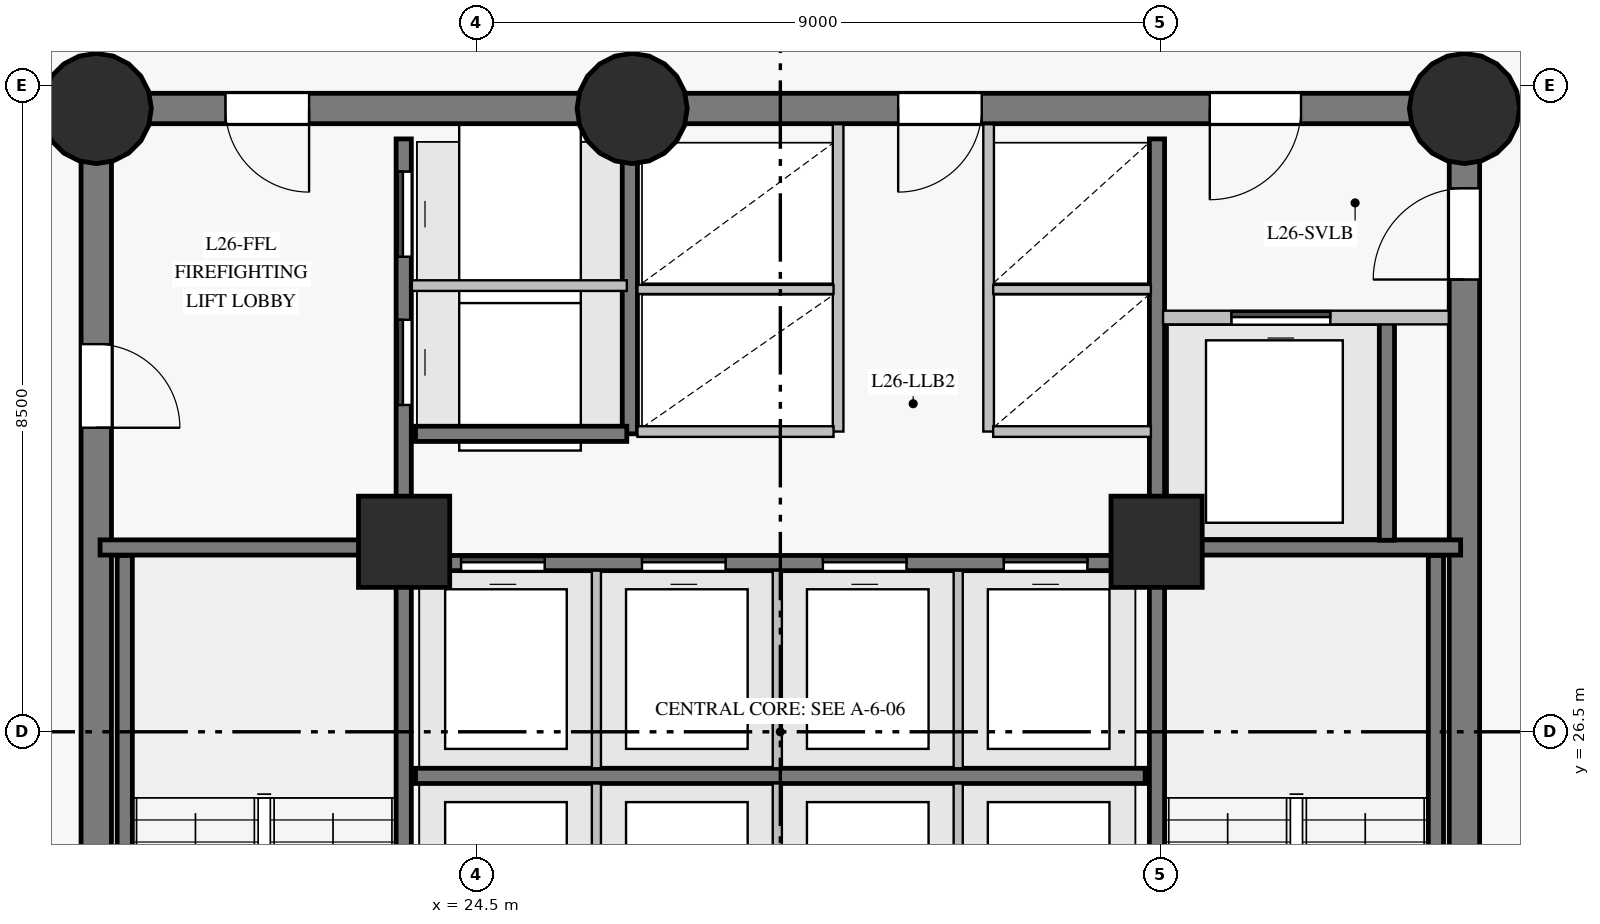
"""IFC4 building model, lengths in metres.
Left out: names, types, materials, properties, quantities, classifications, styles, units other than length and angle.
Written with IfcOpenShell. Run it as: python <this file> out.ifc"""

import sys

from ifc_helpers import new_model, si_unit, direction, frame, frame_2d, origin, origin_with_axes, origin_2d, place, context, subcontext, project, spatial, rectangle, circle, extrude, source, transform, mapped, element, fill, save


model = new_model("IFC4")
c1 = context("Model", 3, precision=1e-05, world=origin(), true_north=direction((0.0, 1.0)))
c2 = subcontext(c1, "Body", "Model", "MODEL_VIEW")
j1 = project(units=[si_unit("LENGTHUNIT", "METRE"), si_unit("PLANEANGLEUNIT", "RADIAN")], contexts=[c1])
p1 = place(None, origin())
s1 = spatial("IfcSite", under=j1, at=p1, CompositionType="ELEMENT")
p2 = place(p1, origin())
s2 = spatial("IfcBuilding", under=s1, at=p2, CompositionType="ELEMENT")
p3 = place(p2, frame((0.0, 0.0, 99.25)))
s3 = spatial("IfcBuildingStorey", under=s2, at=p3, CompositionType="ELEMENT", Elevation=99.25)
p4 = place(p3, frame((37.5, 18.3, 0.0), z_axis=(0.0, 0.0, 1.0), x_axis=(0.0, 1.0, 0.0)))
e1 = element("IfcWall", 1, at=p4, inside=s3, PredefinedType="SHEAR", context=c2, shape_type="SweptSolid", body=[
    extrude(rectangle(XDim=16.4, YDim=0.4, at=frame_2d((8.2, 0.0))), origin(), (0.0, 0.0, 1.0), 2.825),
])
p5 = place(p4, frame((14.15, 0.0, 0.0)))
e2 = element("IfcOpeningElement", 2, at=p5, cuts=e1, PredefinedType="OPENING", context=c2, shape_type="SweptSolid", body=[
    extrude(rectangle(XDim=1.2, YDim=2.15, at=frame_2d((0.6, 1.075))), frame((0.0, 0.21, 0.0), z_axis=(0.0, -1.0, 0.0), x_axis=(1.0, 0.0, 0.0)), (0.0, 0.0, 1.0), 0.42),
])
p6 = place(p3, frame((37.5, 34.7, 0.0), z_axis=(0.0, 0.0, 1.0), x_axis=(-1.0, 0.0, 0.0)))
e3 = element("IfcWall", 3, at=p6, inside=s3, PredefinedType="SHEAR", context=c2, shape_type="SweptSolid", body=[
    extrude(rectangle(XDim=10.95, YDim=0.4, at=frame_2d((5.475, 0.0))), origin(), (0.0, 0.0, 1.0), 2.825),
])
p7 = place(p6, frame((2.15, 0.0, 0.0)))
e4 = element("IfcOpeningElement", 4, at=p7, cuts=e3, PredefinedType="OPENING", context=c2, shape_type="SweptSolid", body=[
    extrude(rectangle(XDim=1.2, YDim=2.15, at=frame_2d((0.6, 1.075))), frame((0.0, 0.21, 0.0), z_axis=(0.0, -1.0, 0.0), x_axis=(1.0, 0.0, 0.0)), (0.0, 0.0, 1.0), 0.42),
])
p8 = place(p6, frame((6.35, 0.0, 0.0)))
e5 = element("IfcOpeningElement", 5, at=p8, cuts=e3, PredefinedType="OPENING", context=c2, shape_type="SweptSolid", body=[
    extrude(rectangle(XDim=1.1, YDim=2.15, at=frame_2d((0.55, 1.075))), frame((0.0, 0.21, 0.0), z_axis=(0.0, -1.0, 0.0), x_axis=(1.0, 0.0, 0.0)), (0.0, 0.0, 1.0), 0.42),
])
p9 = place(p3, frame((26.55, 34.7, 0.0), z_axis=(0.0, 0.0, 1.0), x_axis=(-1.0, 0.0, 0.0)))
e6 = element("IfcWall", 6, at=p9, inside=s3, PredefinedType="SHEAR", context=c2, shape_type="SweptSolid", body=[
    extrude(rectangle(XDim=7.05, YDim=0.4, at=frame_2d((3.525, 0.0))), origin(), (0.0, 0.0, 1.0), 2.825),
])
p10 = place(p9, frame((4.25, 0.0, 0.0)))
e7 = element("IfcOpeningElement", 7, at=p10, cuts=e6, PredefinedType="OPENING", context=c2, shape_type="SweptSolid", body=[
    extrude(rectangle(XDim=1.1, YDim=2.15, at=frame_2d((0.55, 1.075))), frame((0.0, 0.21, 0.0), z_axis=(0.0, -1.0, 0.0), x_axis=(1.0, 0.0, 0.0)), (0.0, 0.0, 1.0), 0.42),
])
p11 = place(p3, frame((19.5, 34.7, 0.0), z_axis=(0.0, 0.0, 1.0), x_axis=(0.0, -1.0, 0.0)))
e8 = element("IfcWall", 8, at=p11, inside=s3, PredefinedType="SHEAR", context=c2, shape_type="SweptSolid", body=[
    extrude(rectangle(XDim=16.4, YDim=0.4, at=frame_2d((8.2, 0.0))), origin(), (0.0, 0.0, 1.0), 2.825),
])
p12 = place(p11, frame((3.1, 0.0, 0.0)))
e9 = element("IfcOpeningElement", 9, at=p12, cuts=e8, PredefinedType="OPENING", context=c2, shape_type="SweptSolid", body=[
    extrude(rectangle(XDim=1.1, YDim=2.15, at=frame_2d((0.55, 1.075))), frame((0.0, 0.21, 0.0), z_axis=(0.0, -1.0, 0.0), x_axis=(1.0, 0.0, 0.0)), (0.0, 0.0, 1.0), 0.42),
])
m1 = source(origin_with_axes(), c2, "Body", "SweptSolid", [
    extrude(circle(Radius=0.725, at=origin_2d()), origin(), (0.0, 0.0, 1.0), 3.05),
])
for number, where, z_axis, x_axis in (
    (10, (19.5, 34.7, 0.0), (0.0, 0.0, 1.0), (1.0, 0.0, 0.0)),
    (11, (26.55, 34.7, 0.0), (0.0, 0.0, 1.0), (1.0, 0.0, 0.0)),
    (12, (37.5, 34.7, 0.0), (0.0, 0.0, 1.0), (1.0, 0.0, 0.0)),
):
    element("IfcColumn", number, at=place(p3, frame(where, z_axis=z_axis, x_axis=x_axis)), inside=s3, PredefinedType="COLUMN", context=c2, shape_type="MappedRepresentation", body=[
        mapped(m1, transform((0.0, 0.0, 0.0), scale=1.0)),
    ])
m2 = source(origin_with_axes(), c2, "Body", "SweptSolid", [
    extrude(rectangle(XDim=1.2, YDim=1.2, at=origin_2d()), origin(), (0.0, 0.0, 1.0), 3.05),
])
for number, where, z_axis, x_axis in (
    (13, (23.55, 29.0, 0.0), (0.0, 0.0, 1.0), (1.0, 0.0, 0.0)),
    (14, (33.45, 29.0, 0.0), (0.0, 0.0, 1.0), (1.0, 0.0, 0.0)),
):
    element("IfcColumn", number, at=place(p3, frame(where, z_axis=z_axis, x_axis=x_axis)), inside=s3, PredefinedType="COLUMN", context=c2, shape_type="MappedRepresentation", body=[
        mapped(m2, transform((0.0, 0.0, 0.0), scale=1.0)),
    ])
p13 = place(p3, frame((23.545, 18.7, 0.0), z_axis=(0.0, 0.0, 1.0), x_axis=(0.0, 1.0, 0.0)))
e15 = element("IfcWall", 15, at=p13, inside=s3, PredefinedType="SHEAR", context=c2, shape_type="SweptSolid", body=[
    extrude(rectangle(XDim=15.6, YDim=0.2, at=frame_2d((7.8, 0.0))), origin(), (0.0, 0.0, 1.0), 2.825),
])
p14 = place(p13, frame((2.75, 0.0, 0.0)))
e16 = element("IfcOpeningElement", 16, at=p14, cuts=e15, PredefinedType="OPENING", context=c2, shape_type="SweptSolid", body=[
    extrude(rectangle(XDim=1.15, YDim=2.15, at=frame_2d((0.575, 1.075))), frame((0.0, 0.11, 0.0), z_axis=(0.0, -1.0, 0.0), x_axis=(1.0, 0.0, 0.0)), (0.0, 0.0, 1.0), 0.22),
])
p15 = place(p13, frame((0.14, 0.0, 0.0)))
e17 = element("IfcOpeningElement", 17, at=p15, cuts=e15, PredefinedType="OPENING", context=c2, shape_type="SweptSolid", body=[
    extrude(rectangle(XDim=0.88, YDim=2.1, at=frame_2d((0.44, 1.05))), frame((0.0, 0.11, 0.0), z_axis=(0.0, -1.0, 0.0), x_axis=(1.0, 0.0, 0.0)), (0.0, 0.0, 1.0), 0.22),
])
p16 = place(p13, frame((1.36, 0.0, 0.0)))
e18 = element("IfcOpeningElement", 18, at=p16, cuts=e15, PredefinedType="OPENING", context=c2, shape_type="SweptSolid", body=[
    extrude(rectangle(XDim=0.88, YDim=2.1, at=frame_2d((0.44, 1.05))), frame((0.0, 0.11, 0.0), z_axis=(0.0, -1.0, 0.0), x_axis=(1.0, 0.0, 0.0)), (0.0, 0.0, 1.0), 0.22),
])
p17 = place(p13, frame((12.1, 0.0, 0.0)))
e19 = element("IfcOpeningElement", 19, at=p17, cuts=e15, PredefinedType="OPENING", context=c2, shape_type="SweptSolid", body=[
    extrude(rectangle(XDim=1.12, YDim=2.15, at=frame_2d((0.56, 1.075))), frame((0.0, 0.11, 0.0), z_axis=(0.0, -1.0, 0.0), x_axis=(1.0, 0.0, 0.0)), (0.0, 0.0, 1.0), 0.22),
])
p18 = place(p13, frame((14.05, 0.0, 0.0)))
e20 = element("IfcOpeningElement", 20, at=p18, cuts=e15, PredefinedType="OPENING", context=c2, shape_type="SweptSolid", body=[
    extrude(rectangle(XDim=1.12, YDim=2.15, at=frame_2d((0.56, 1.075))), frame((0.0, 0.11, 0.0), z_axis=(0.0, -1.0, 0.0), x_axis=(1.0, 0.0, 0.0)), (0.0, 0.0, 1.0), 0.22),
])
p19 = place(p3, frame((33.455, 18.7, 0.0), z_axis=(0.0, 0.0, 1.0), x_axis=(0.0, 1.0, 0.0)))
e21 = element("IfcWall", 21, at=p19, inside=s3, PredefinedType="SHEAR", context=c2, shape_type="SweptSolid", body=[
    extrude(rectangle(XDim=15.6, YDim=0.2, at=frame_2d((7.8, 0.0))), origin(), (0.0, 0.0, 1.0), 2.825),
])
p20 = place(p19, frame((2.75, 0.0, 0.0)))
e22 = element("IfcOpeningElement", 22, at=p20, cuts=e21, PredefinedType="OPENING", context=c2, shape_type="SweptSolid", body=[
    extrude(rectangle(XDim=1.15, YDim=2.15, at=frame_2d((0.575, 1.075))), frame((0.0, 0.11, 0.0), z_axis=(0.0, -1.0, 0.0), x_axis=(1.0, 0.0, 0.0)), (0.0, 0.0, 1.0), 0.22),
])
p21 = place(p19, frame((0.55, 0.0, 0.0)))
e23 = element("IfcOpeningElement", 23, at=p21, cuts=e21, PredefinedType="OPENING", context=c2, shape_type="SweptSolid", body=[
    extrude(rectangle(XDim=0.94, YDim=2.1, at=frame_2d((0.47, 1.05))), frame((0.0, 0.11, 0.0), z_axis=(0.0, -1.0, 0.0), x_axis=(1.0, 0.0, 0.0)), (0.0, 0.0, 1.0), 0.22),
])
p22 = place(p3, frame((23.7, 25.92, 0.0), z_axis=(0.0, 0.0, 1.0), x_axis=(1.0, 0.0, 0.0)))
e24 = element("IfcWall", 24, at=p22, inside=s3, PredefinedType="SHEAR", context=c2, shape_type="SweptSolid", body=[
    extrude(rectangle(XDim=9.6, YDim=0.2, at=frame_2d((4.8, 0.0))), origin(), (0.0, 0.0, 1.0), 2.825),
])
p23 = place(p3, frame((23.7, 28.72, 0.0), z_axis=(0.0, 0.0, 1.0), x_axis=(1.0, 0.0, 0.0)))
e25 = element("IfcWall", 25, at=p23, inside=s3, PredefinedType="SHEAR", context=c2, shape_type="SweptSolid", body=[
    extrude(rectangle(XDim=9.6, YDim=0.2, at=frame_2d((4.8, 0.0))), origin(), (0.0, 0.0, 1.0), 2.825),
])
p24 = place(p23, frame((0.6, 0.0, 0.0)))
e26 = element("IfcOpeningElement", 26, at=p24, cuts=e25, PredefinedType="OPENING", context=c2, shape_type="SweptSolid", body=[
    extrude(rectangle(XDim=1.1, YDim=2.15, at=frame_2d((0.55, 1.075))), frame((0.0, 0.11, 0.0), z_axis=(0.0, -1.0, 0.0), x_axis=(1.0, 0.0, 0.0)), (0.0, 0.0, 1.0), 0.22),
])
p25 = place(p23, frame((2.98, 0.0, 0.0)))
e27 = element("IfcOpeningElement", 27, at=p25, cuts=e25, PredefinedType="OPENING", context=c2, shape_type="SweptSolid", body=[
    extrude(rectangle(XDim=1.1, YDim=2.15, at=frame_2d((0.55, 1.075))), frame((0.0, 0.11, 0.0), z_axis=(0.0, -1.0, 0.0), x_axis=(1.0, 0.0, 0.0)), (0.0, 0.0, 1.0), 0.22),
])
p26 = place(p23, frame((5.36, 0.0, 0.0)))
e28 = element("IfcOpeningElement", 28, at=p26, cuts=e25, PredefinedType="OPENING", context=c2, shape_type="SweptSolid", body=[
    extrude(rectangle(XDim=1.1, YDim=2.15, at=frame_2d((0.55, 1.075))), frame((0.0, 0.11, 0.0), z_axis=(0.0, -1.0, 0.0), x_axis=(1.0, 0.0, 0.0)), (0.0, 0.0, 1.0), 0.22),
])
p27 = place(p23, frame((7.74, 0.0, 0.0)))
e29 = element("IfcOpeningElement", 29, at=p27, cuts=e25, PredefinedType="OPENING", context=c2, shape_type="SweptSolid", body=[
    extrude(rectangle(XDim=1.1, YDim=2.15, at=frame_2d((0.55, 1.075))), frame((0.0, 0.11, 0.0), z_axis=(0.0, -1.0, 0.0), x_axis=(1.0, 0.0, 0.0)), (0.0, 0.0, 1.0), 0.22),
])
for number, where, z_axis, x_axis in (
    (30, (19.875, 21.32, 0.0), (0.0, 0.0, 1.0), (0.0, 1.0, 0.0)),
    (31, (37.125, 21.32, 0.0), (0.0, 0.0, 1.0), (0.0, 1.0, 0.0)),
):
    element("IfcWall", number, at=place(p3, frame(where, z_axis=z_axis, x_axis=x_axis)), inside=s3, PredefinedType="SHEAR", context=c2, shape_type="SweptSolid", body=[
        extrude(rectangle(XDim=7.5, YDim=0.2, at=frame_2d((3.75, 0.0))), origin(), (0.0, 0.0, 1.0), 2.825),
    ])
for number, where, z_axis, x_axis in (
    (32, (33.455, 28.925, 0.0), (0.0, 0.0, 1.0), (1.0, 0.0, 0.0)),
    (33, (19.55, 28.925, 0.0), (0.0, 0.0, 1.0), (1.0, 0.0, 0.0)),
):
    element("IfcWall", number, at=place(p3, frame(where, z_axis=z_axis, x_axis=x_axis)), inside=s3, PredefinedType="SHEAR", context=c2, shape_type="SweptSolid", body=[
        extrude(rectangle(XDim=3.995, YDim=0.2, at=frame_2d((1.998, 0.0))), origin(), (0.0, 0.0, 1.0), 2.825),
    ])
p28 = place(p3, frame((26.52, 30.42, 0.0), z_axis=(0.0, 0.0, 1.0), x_axis=(0.0, 1.0, 0.0)))
e34 = element("IfcWall", 34, at=p28, inside=s3, PredefinedType="SHEAR", context=c2, shape_type="SweptSolid", body=[
    extrude(rectangle(XDim=3.86, YDim=0.2, at=frame_2d((1.93, 0.0))), origin(), (0.0, 0.0, 1.0), 2.825),
])
p29 = place(p3, frame((36.48, 29.02, 0.0), z_axis=(0.0, 0.0, 1.0), x_axis=(0.0, 1.0, 0.0)))
e35 = element("IfcWall", 35, at=p29, inside=s3, PredefinedType="SHEAR", context=c2, shape_type="SweptSolid", body=[
    extrude(rectangle(XDim=2.86, YDim=0.2, at=frame_2d((1.43, 0.0))), origin(), (0.0, 0.0, 1.0), 2.825),
])
p30 = place(p3, frame((23.7, 30.42, 0.0), z_axis=(0.0, 0.0, 1.0), x_axis=(1.0, 0.0, 0.0)))
e36 = element("IfcWall", 36, at=p30, inside=s3, PredefinedType="SHEAR", context=c2, shape_type="SweptSolid", body=[
    extrude(rectangle(XDim=2.78, YDim=0.2, at=frame_2d((1.39, 0.0))), origin(), (0.0, 0.0, 1.0), 2.825),
])
for number, where, z_axis, x_axis in (
    (37, (29.26, 30.45, 0.0), (0.0, 0.0, 1.0), (0.0, 1.0, 0.0)),
    (38, (31.24, 30.45, 0.0), (0.0, 0.0, 1.0), (0.0, 1.0, 0.0)),
):
    element("IfcWall", number, at=place(p3, frame(where, z_axis=z_axis, x_axis=x_axis)), inside=s3, PredefinedType="PARTITIONING", context=c2, shape_type="SweptSolid", body=[
        extrude(rectangle(XDim=4.043, YDim=0.14, at=frame_2d((2.021, 0.0))), origin(), (0.0, 0.0, 1.0), 2.825),
    ])
p31 = place(p3, frame((33.535, 31.95, 0.0), z_axis=(0.0, 0.0, 1.0), x_axis=(1.0, 0.0, 0.0)))
e39 = element("IfcWall", 39, at=p31, inside=s3, PredefinedType="PARTITIONING", context=c2, shape_type="SweptSolid", body=[
    extrude(rectangle(XDim=3.759, YDim=0.18, at=frame_2d((1.879, 0.0))), origin(), (0.0, 0.0, 1.0), 2.825),
])
p32 = place(p31, frame((0.9, 0.0, 0.0)))
e40 = element("IfcOpeningElement", 40, at=p32, cuts=e39, PredefinedType="OPENING", context=c2, shape_type="SweptSolid", body=[
    extrude(rectangle(XDim=1.3, YDim=2.2, at=frame_2d((0.65, 1.1))), frame((0.0, 0.1, 0.0), z_axis=(0.0, -1.0, 0.0), x_axis=(1.0, 0.0, 0.0)), (0.0, 0.0, 1.0), 0.2),
])
p33 = place(p3, frame((23.652, 32.37, 0.0), z_axis=(0.0, 0.0, 1.0), x_axis=(1.0, 0.0, 0.0)))
e41 = element("IfcWall", 41, at=p33, inside=s3, PredefinedType="PARTITIONING", context=c2, shape_type="SweptSolid", body=[
    extrude(rectangle(XDim=2.828, YDim=0.14, at=frame_2d((1.414, 0.0))), origin(), (0.0, 0.0, 1.0), 2.825),
])
for number, where, z_axis, x_axis in (
    (42, (26.08, 23.22, 0.0), (0.0, 0.0, 1.0), (0.0, 1.0, 0.0)),
    (43, (28.46, 23.22, 0.0), (0.0, 0.0, 1.0), (0.0, 1.0, 0.0)),
    (44, (30.84, 23.22, 0.0), (0.0, 0.0, 1.0), (0.0, 1.0, 0.0)),
    (45, (26.08, 26.02, 0.0), (0.0, 0.0, 1.0), (0.0, 1.0, 0.0)),
    (46, (28.46, 26.02, 0.0), (0.0, 0.0, 1.0), (0.0, 1.0, 0.0)),
    (47, (30.84, 26.02, 0.0), (0.0, 0.0, 1.0), (0.0, 1.0, 0.0)),
):
    element("IfcWall", number, at=place(p3, frame(where, z_axis=z_axis, x_axis=x_axis)), inside=s3, PredefinedType="PARTITIONING", context=c2, shape_type="SweptSolid", body=[
        extrude(rectangle(XDim=2.6, YDim=0.12, at=frame_2d((1.3, 0.0))), origin(), (0.0, 0.0, 1.0), 2.825),
    ])
p34 = place(p3, frame((26.62, 30.45, 0.0), z_axis=(0.0, 0.0, 1.0), x_axis=(1.0, 0.0, 0.0)))
e48 = element("IfcWall", 48, at=p34, inside=s3, PredefinedType="PARTITIONING", context=c2, shape_type="SweptSolid", body=[
    extrude(rectangle(XDim=2.58, YDim=0.14, at=frame_2d((1.29, 0.0))), origin(), (0.0, 0.0, 1.0), 2.825),
])
p35 = place(p3, frame((26.62, 32.32, 0.0), z_axis=(0.0, 0.0, 1.0), x_axis=(1.0, 0.0, 0.0)))
e49 = element("IfcWall", 49, at=p35, inside=s3, PredefinedType="PARTITIONING", context=c2, shape_type="SweptSolid", body=[
    extrude(rectangle(XDim=2.58, YDim=0.12, at=frame_2d((1.29, 0.0))), origin(), (0.0, 0.0, 1.0), 2.825),
])
p36 = place(p3, frame((31.3, 30.45, 0.0), z_axis=(0.0, 0.0, 1.0), x_axis=(1.0, 0.0, 0.0)))
e50 = element("IfcWall", 50, at=p36, inside=s3, PredefinedType="PARTITIONING", context=c2, shape_type="SweptSolid", body=[
    extrude(rectangle(XDim=2.075, YDim=0.14, at=frame_2d((1.038, 0.0))), origin(), (0.0, 0.0, 1.0), 2.825),
])
p37 = place(p3, frame((31.3, 32.32, 0.0), z_axis=(0.0, 0.0, 1.0), x_axis=(1.0, 0.0, 0.0)))
e51 = element("IfcWall", 51, at=p37, inside=s3, PredefinedType="PARTITIONING", context=c2, shape_type="SweptSolid", body=[
    extrude(rectangle(XDim=2.075, YDim=0.12, at=frame_2d((1.038, 0.0))), origin(), (0.0, 0.0, 1.0), 2.825),
])
m3 = source(origin_with_axes(), c2, "Body", "SweptSolid", [
    extrude(rectangle(XDim=1.1, YDim=2.15, at=frame_2d((0.55, 1.075))), frame((0.0, 0.025, 0.0), z_axis=(0.0, -1.0, 0.0), x_axis=(1.0, 0.0, 0.0)), (0.0, 0.0, 1.0), 0.05),
])
p38 = place(p10, origin())
e52 = element("IfcDoor", 52, at=p38, inside=s3, OperationType="SINGLE_SWING_LEFT", PredefinedType="DOOR", context=c2, shape_type="MappedRepresentation", body=[
    mapped(m3, transform((0.0, 0.0, 0.0), scale=1.0)),
])
fill(e7, e52)
p39 = place(p12, origin())
e53 = element("IfcDoor", 53, at=p39, inside=s3, OperationType="SINGLE_SWING_RIGHT", PredefinedType="DOOR", context=c2, shape_type="MappedRepresentation", body=[
    mapped(m3, transform((0.0, 0.0, 0.0), scale=1.0)),
])
fill(e9, e53)
m4 = source(origin_with_axes(), c2, "Body", "SweptSolid", [
    extrude(rectangle(XDim=1.2, YDim=2.15, at=frame_2d((0.6, 1.075))), frame((0.0, 0.025, 0.0), z_axis=(0.0, -1.0, 0.0), x_axis=(1.0, 0.0, 0.0)), (0.0, 0.0, 1.0), 0.05),
])
p40 = place(p5, origin())
e54 = element("IfcDoor", 54, at=p40, inside=s3, OperationType="SINGLE_SWING_LEFT", PredefinedType="DOOR", context=c2, shape_type="MappedRepresentation", body=[
    mapped(m4, transform((0.0, 0.0, 0.0), scale=1.0)),
])
fill(e2, e54)
p41 = place(p7, origin())
e55 = element("IfcDoor", 55, at=p41, inside=s3, OperationType="SINGLE_SWING_RIGHT", PredefinedType="DOOR", context=c2, shape_type="MappedRepresentation", body=[
    mapped(m4, transform((0.0, 0.0, 0.0), scale=1.0)),
])
fill(e4, e55)
m5 = source(origin_with_axes(), c2, "Body", "SweptSolid", [
    extrude(rectangle(XDim=1.3, YDim=2.2, at=frame_2d((0.65, 1.1))), frame((0.0, 0.025, 0.0), z_axis=(0.0, -1.0, 0.0), x_axis=(1.0, 0.0, 0.0)), (0.0, 0.0, 1.0), 0.05),
])
p42 = place(p32, origin())
e56 = element("IfcDoor", 56, at=p42, inside=s3, OperationType="SLIDING_TO_LEFT", PredefinedType="DOOR", context=c2, shape_type="MappedRepresentation", body=[
    mapped(m5, transform((0.0, 0.0, 0.0), scale=1.0)),
])
fill(e40, e56)
p43 = place(p24, origin())
e57 = element("IfcDoor", 57, at=p43, inside=s3, OperationType="SLIDING_TO_LEFT", PredefinedType="DOOR", context=c2, shape_type="MappedRepresentation", body=[
    mapped(m3, transform((0.0, 0.0, 0.0), scale=1.0)),
])
fill(e26, e57)
p44 = place(p25, origin())
e58 = element("IfcDoor", 58, at=p44, inside=s3, OperationType="SLIDING_TO_RIGHT", PredefinedType="DOOR", context=c2, shape_type="MappedRepresentation", body=[
    mapped(m3, transform((0.0, 0.0, 0.0), scale=1.0)),
])
fill(e27, e58)
p45 = place(p26, origin())
e59 = element("IfcDoor", 59, at=p45, inside=s3, OperationType="SLIDING_TO_LEFT", PredefinedType="DOOR", context=c2, shape_type="MappedRepresentation", body=[
    mapped(m3, transform((0.0, 0.0, 0.0), scale=1.0)),
])
fill(e28, e59)
p46 = place(p27, origin())
e60 = element("IfcDoor", 60, at=p46, inside=s3, OperationType="SLIDING_TO_RIGHT", PredefinedType="DOOR", context=c2, shape_type="MappedRepresentation", body=[
    mapped(m3, transform((0.0, 0.0, 0.0), scale=1.0)),
])
fill(e29, e60)
p47 = place(p8, origin())
e61 = element("IfcDoor", 61, at=p47, inside=s3, OperationType="SINGLE_SWING_RIGHT", PredefinedType="DOOR", context=c2, shape_type="MappedRepresentation", body=[
    mapped(m3, transform((0.0, 0.0, 0.0), scale=1.0)),
])
fill(e5, e61)
m6 = source(origin_with_axes(), c2, "Body", "SweptSolid", [
    extrude(rectangle(XDim=1.12, YDim=2.15, at=frame_2d((0.56, 1.075))), frame((0.0, 0.025, 0.0), z_axis=(0.0, -1.0, 0.0), x_axis=(1.0, 0.0, 0.0)), (0.0, 0.0, 1.0), 0.05),
])
p48 = place(p17, origin())
e62 = element("IfcDoor", 62, at=p48, inside=s3, OperationType="SLIDING_TO_LEFT", PredefinedType="DOOR", context=c2, shape_type="MappedRepresentation", body=[
    mapped(m6, transform((0.0, 0.0, 0.0), scale=1.0)),
])
fill(e19, e62)
p49 = place(p18, origin())
e63 = element("IfcDoor", 63, at=p49, inside=s3, OperationType="SLIDING_TO_RIGHT", PredefinedType="DOOR", context=c2, shape_type="MappedRepresentation", body=[
    mapped(m6, transform((0.0, 0.0, 0.0), scale=1.0)),
])
fill(e20, e63)
save(model, sys.argv[1])
